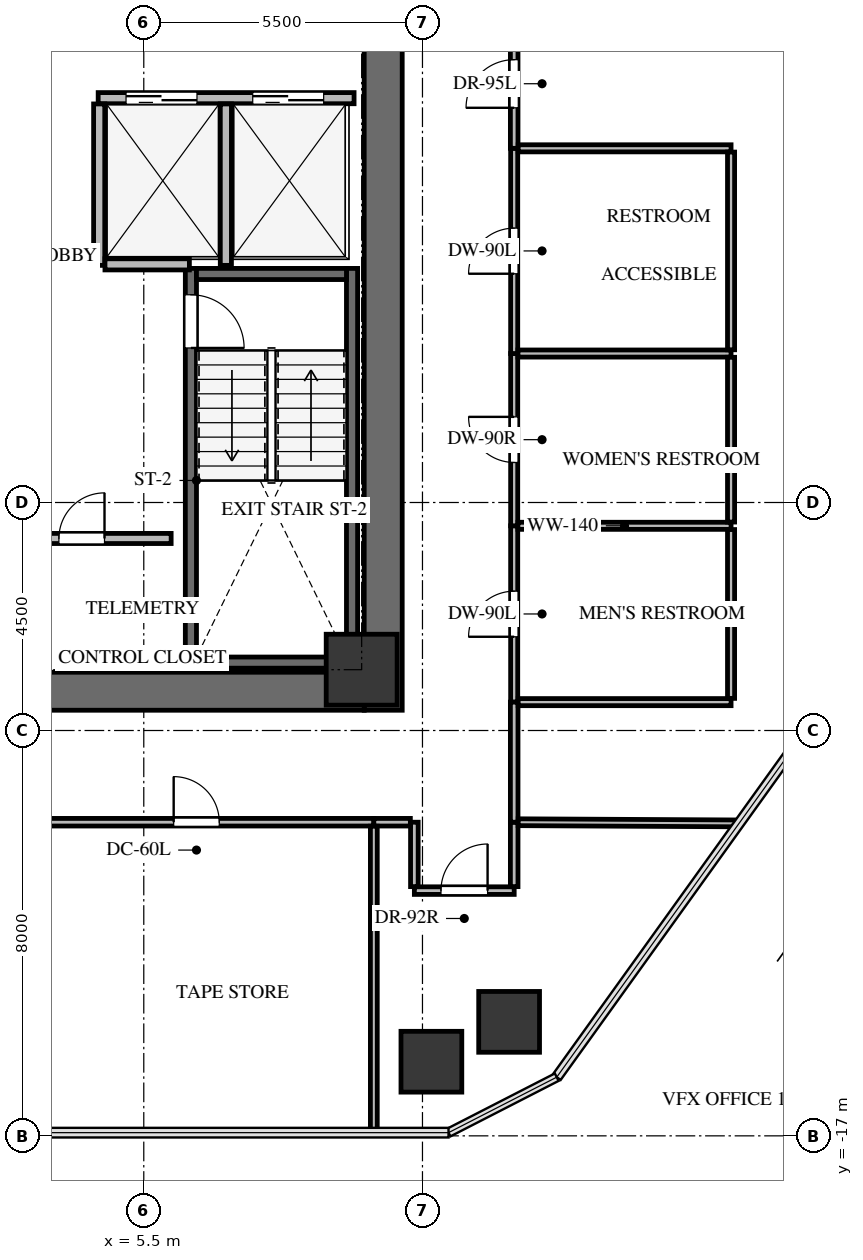
"""IFC4 building model, lengths in metres.
Left out: names, types, materials, properties, quantities, classifications, styles, units other than length and angle.
Written with IfcOpenShell. Run it as: python <this file> out.ifc"""

import sys

from ifc_helpers import new_model, si_unit, direction, frame, frame_2d, origin, origin_2d, place, context, subcontext, project, spatial, rectangle, extrude, source, transform, mapped, element, fill, save


model = new_model("IFC4")
c1 = context("Model", 3, precision=1e-05, world=origin(), true_north=direction((0.0, 1.0)))
c2 = subcontext(c1, "Body", "Model", "MODEL_VIEW")
j1 = project(units=[si_unit("LENGTHUNIT", "METRE"), si_unit("PLANEANGLEUNIT", "RADIAN")], contexts=[c1])
p1 = place(None, origin())
s1 = spatial("IfcSite", under=j1, at=p1, CompositionType="ELEMENT")
p2 = place(p1, origin())
s2 = spatial("IfcBuilding", under=s1, at=p2, CompositionType="ELEMENT")
p3 = place(p2, frame((0.0, 0.0, 110.7)))
s3 = spatial("IfcBuildingStorey", under=s2, at=p3, CompositionType="ELEMENT", Elevation=110.7)
p4 = place(p3, frame((10.225, -8.6, 0.0), z_axis=(0.0, 0.0, 1.0), x_axis=(0.0, 1.0, 0.0)))
e1 = element("IfcWall", 1, at=p4, inside=s3, PredefinedType="SHEAR", context=c2, shape_type="SweptSolid", body=[
    extrude(rectangle(XDim=17.2, YDim=0.75, at=frame_2d((8.6, 0.0))), origin(), (0.0, 0.0, 1.0), 3.3),
])
p5 = place(p3, frame((2.1, -8.225, 0.0), z_axis=(0.0, 0.0, 1.0), x_axis=(1.0, 0.0, 0.0)))
e2 = element("IfcWall", 2, at=p5, inside=s3, PredefinedType="SHEAR", context=c2, shape_type="SweptSolid", body=[
    extrude(rectangle(XDim=7.75, YDim=0.75, at=frame_2d((3.875, 0.0))), origin(), (0.0, 0.0, 1.0), 3.3),
])
p6 = place(p3, frame((9.61, -7.77, -0.24), z_axis=(0.0, 0.0, 1.0), x_axis=(0.0, 1.0, 0.0)))
e3 = element("IfcWall", 3, at=p6, inside=s3, PredefinedType="SHEAR", context=c2, shape_type="SweptSolid", body=[
    extrude(rectangle(XDim=7.89, YDim=0.22, at=frame_2d((3.945, 0.0))), origin(), (0.0, 0.0, 1.0), 3.3),
])
p7 = place(p3, frame((6.43, 0.12, -0.24), z_axis=(0.0, 0.0, 1.0), x_axis=(0.0, -1.0, 0.0)))
e4 = element("IfcWall", 4, at=p7, inside=s3, PredefinedType="SHEAR", context=c2, shape_type="SweptSolid", body=[
    extrude(rectangle(XDim=7.89, YDim=0.22, at=frame_2d((3.945, 0.0))), origin(), (0.0, 0.0, 1.0), 3.3),
])
p8 = place(p7, frame((0.52, 0.0, 0.0)))
e5 = element("IfcOpeningElement", 5, at=p8, cuts=e4, PredefinedType="OPENING", context=c2, shape_type="SweptSolid", body=[
    extrude(rectangle(XDim=1.05, YDim=2.15, at=frame_2d((0.525, 1.075))), frame((0.0, 0.12, 0.0), z_axis=(0.0, -1.0, 0.0), x_axis=(1.0, 0.0, 0.0)), (0.0, 0.0, 1.0), 0.24),
])
for number, where, z_axis, x_axis in (
    (6, (6.54, -7.66, -0.24), (0.0, 0.0, 1.0), (1.0, 0.0, 0.0)),
    (7, (9.5, 0.01, -0.24), (0.0, 0.0, 1.0), (-1.0, 0.0, 0.0)),
):
    element("IfcWall", number, at=place(p3, frame(where, z_axis=z_axis, x_axis=x_axis)), inside=s3, PredefinedType="SHEAR", context=c2, shape_type="SweptSolid", body=[
        extrude(rectangle(XDim=2.96, YDim=0.22, at=frame_2d((1.48, 0.0))), origin(), (0.0, 0.0, 1.0), 3.3),
    ])
m1 = source(origin(), c2, "Body", "SweptSolid", [
    extrude(rectangle(XDim=1.4, YDim=1.4, at=origin_2d()), origin(), (0.0, 0.0, 1.0), 3.3),
])
p9 = place(p3, frame((9.8, -7.8, -0.24), z_axis=(0.0, 0.0, 1.0), x_axis=(1.0, 0.0, 0.0)))
e8 = element("IfcColumn", 8, at=p9, inside=s3, PredefinedType="COLUMN", context=c2, shape_type="MappedRepresentation", body=[
    mapped(m1, transform((0.0, 0.0, 0.0), x_axis=(1.0, 0.0, 0.0), y_axis=(0.0, 1.0, 0.0), z_axis=(0.0, 0.0, 1.0), scale=1.0)),
])
m2 = source(origin(), c2, "Body", "SweptSolid", [
    extrude(rectangle(XDim=1.2, YDim=1.2, at=origin_2d()), origin(), (0.0, 0.0, 1.0), 3.3),
])
for number, where, z_axis, x_axis in (
    (9, (12.71, -14.75, -0.24), (0.0, 0.0, 1.0), (1.0, 0.0, 0.0)),
    (10, (11.176, -15.537, -0.24), (0.0, 0.0, 1.0), (1.0, 0.0, 0.0)),
):
    element("IfcColumn", number, at=place(p3, frame(where, z_axis=z_axis, x_axis=x_axis)), inside=s3, PredefinedType="COLUMN", context=c2, shape_type="MappedRepresentation", body=[
        mapped(m2, transform((0.0, 0.0, 0.0), x_axis=(1.0, 0.0, 0.0), y_axis=(0.0, 1.0, 0.0), z_axis=(0.0, 0.0, 1.0), scale=1.0)),
    ])
p10 = place(p3, frame((4.6, 3.48, 0.0), z_axis=(0.0, 0.0, 1.0), x_axis=(1.0, 0.0, 0.0)))
e11 = element("IfcWall", 11, at=p10, inside=s3, PredefinedType="SOLIDWALL", context=c2, shape_type="SweptSolid", body=[
    extrude(rectangle(XDim=5.05, YDim=0.22, at=frame_2d((2.525, 0.0))), origin(), (0.0, 0.0, 1.0), 3.045),
])
p11 = place(p10, frame((0.55, 0.0, 0.0)))
e12 = element("IfcOpeningElement", 12, at=p11, cuts=e11, PredefinedType="OPENING", context=c2, shape_type="SweptSolid", body=[
    extrude(rectangle(XDim=1.4, YDim=2.15, at=frame_2d((0.7, 1.075))), frame((0.0, 0.12, 0.0), z_axis=(0.0, -1.0, 0.0), x_axis=(1.0, 0.0, 0.0)), (0.0, 0.0, 1.0), 0.24),
])
p12 = place(p10, frame((3.05, 0.0, 0.0)))
e13 = element("IfcOpeningElement", 13, at=p12, cuts=e11, PredefinedType="OPENING", context=c2, shape_type="SweptSolid", body=[
    extrude(rectangle(XDim=1.4, YDim=2.15, at=frame_2d((0.7, 1.075))), frame((0.0, 0.12, 0.0), z_axis=(0.0, -1.0, 0.0), x_axis=(1.0, 0.0, 0.0)), (0.0, 0.0, 1.0), 0.24),
])
for number, where, z_axis, x_axis in (
    (14, (4.62, 0.18, 0.0), (0.0, 0.0, 1.0), (0.0, 1.0, 0.0)),
    (15, (7.12, 0.18, 0.0), (0.0, 0.0, 1.0), (0.0, 1.0, 0.0)),
):
    element("IfcWall", number, at=place(p3, frame(where, z_axis=z_axis, x_axis=x_axis)), inside=s3, PredefinedType="SOLIDWALL", context=c2, shape_type="SweptSolid", body=[
        extrude(rectangle(XDim=3.186, YDim=0.22, at=frame_2d((1.593, 0.0))), origin(), (0.0, 0.0, 1.0), 3.045),
    ])
p13 = place(p3, frame((4.734, 0.2, 0.0), z_axis=(0.0, 0.0, 1.0), x_axis=(1.0, 0.0, 0.0)))
e16 = element("IfcWall", 16, at=p13, inside=s3, PredefinedType="SOLIDWALL", context=c2, shape_type="SweptSolid", body=[
    extrude(rectangle(XDim=1.666, YDim=0.22, at=frame_2d((0.833, 0.0))), origin(), (0.0, 0.0, 1.0), 3.045),
])
p14 = place(p3, frame((2.51, -5.21, 0.0), z_axis=(0.0, 0.0, 1.0), x_axis=(1.0, 0.0, 0.0)))
e17 = element("IfcWall", 17, at=p14, inside=s3, PredefinedType="SOLIDWALL", context=c2, shape_type="SweptSolid", body=[
    extrude(rectangle(XDim=3.53, YDim=0.2, at=frame_2d((1.765, 0.0))), origin(), (0.0, 0.0, 1.0), 3.045),
])
p15 = place(p14, frame((1.315, 0.0, 0.0)))
e18 = element("IfcOpeningElement", 18, at=p15, cuts=e17, PredefinedType="OPENING", context=c2, shape_type="SweptSolid", body=[
    extrude(rectangle(XDim=0.9, YDim=2.05, at=frame_2d((0.45, 1.025))), frame((0.0, 0.11, 0.0), z_axis=(0.0, -1.0, 0.0), x_axis=(1.0, 0.0, 0.0)), (0.0, 0.0, 1.0), 0.22),
])
p16 = place(p3, frame((12.81, -8.44, 0.0), z_axis=(0.0, 0.0, 1.0), x_axis=(0.0, 1.0, 0.0)))
e19 = element("IfcWall", 19, at=p16, inside=s3, PredefinedType="PARTITIONING", context=c2, shape_type="SweptSolid", body=[
    extrude(rectangle(XDim=3.48, YDim=0.14, at=frame_2d((1.74, 0.0))), origin(), (0.0, 0.0, 1.0), 3.045),
])
p17 = place(p16, frame((1.29, 0.0, 0.0)))
e20 = element("IfcOpeningElement", 20, at=p17, cuts=e19, PredefinedType="OPENING", context=c2, shape_type="SweptSolid", body=[
    extrude(rectangle(XDim=0.9, YDim=2.05, at=frame_2d((0.45, 1.025))), frame((0.0, 0.08, 0.0), z_axis=(0.0, -1.0, 0.0), x_axis=(1.0, 0.0, 0.0)), (0.0, 0.0, 1.0), 0.16),
])
p18 = place(p3, frame((12.81, -4.96, 0.0), z_axis=(0.0, 0.0, 1.0), x_axis=(0.0, 1.0, 0.0)))
e21 = element("IfcWall", 21, at=p18, inside=s3, PredefinedType="PARTITIONING", context=c2, shape_type="SweptSolid", body=[
    extrude(rectangle(XDim=3.4, YDim=0.14, at=frame_2d((1.7, 0.0))), origin(), (0.0, 0.0, 1.0), 3.045),
])
p19 = place(p18, frame((1.25, 0.0, 0.0)))
e22 = element("IfcOpeningElement", 22, at=p19, cuts=e21, PredefinedType="OPENING", context=c2, shape_type="SweptSolid", body=[
    extrude(rectangle(XDim=0.9, YDim=2.05, at=frame_2d((0.45, 1.025))), frame((0.0, 0.08, 0.0), z_axis=(0.0, -1.0, 0.0), x_axis=(1.0, 0.0, 0.0)), (0.0, 0.0, 1.0), 0.16),
])
p20 = place(p3, frame((12.81, -1.56, 0.0), z_axis=(0.0, 0.0, 1.0), x_axis=(0.0, 1.0, 0.0)))
e23 = element("IfcWall", 23, at=p20, inside=s3, PredefinedType="PARTITIONING", context=c2, shape_type="SweptSolid", body=[
    extrude(rectangle(XDim=4.05, YDim=0.14, at=frame_2d((2.025, 0.0))), origin(), (0.0, 0.0, 1.0), 2.212),
])
p21 = place(p20, frame((1.575, 0.0, 0.0)))
e24 = element("IfcOpeningElement", 24, at=p21, cuts=e23, PredefinedType="OPENING", context=c2, shape_type="SweptSolid", body=[
    extrude(rectangle(XDim=0.9, YDim=2.05, at=frame_2d((0.45, 1.025))), frame((0.0, 0.08, 0.0), z_axis=(0.0, -1.0, 0.0), x_axis=(1.0, 0.0, 0.0)), (0.0, 0.0, 1.0), 0.16),
])
p22 = place(p3, frame((3.04, -10.81, 0.0), z_axis=(0.0, 0.0, 1.0), x_axis=(1.0, 0.0, 0.0)))
e25 = element("IfcWall", 25, at=p22, inside=s3, PredefinedType="PARTITIONING", context=c2, shape_type="SweptSolid", body=[
    extrude(rectangle(XDim=7.0, YDim=0.15, at=frame_2d((3.5, 0.0))), origin(), (0.0, 0.0, 1.0), 2.212),
])
p23 = place(p22, frame((3.05, 0.0, 0.0)))
e26 = element("IfcOpeningElement", 26, at=p23, cuts=e25, PredefinedType="OPENING", context=c2, shape_type="SweptSolid", body=[
    extrude(rectangle(XDim=0.9, YDim=2.05, at=frame_2d((0.45, 1.025))), frame((0.0, 0.085, 0.0), z_axis=(0.0, -1.0, 0.0), x_axis=(1.0, 0.0, 0.0)), (0.0, 0.0, 1.0), 0.17),
])
p24 = place(p3, frame((10.84, -12.16, 0.0), z_axis=(0.0, 0.0, 1.0), x_axis=(1.0, 0.0, 0.0)))
e27 = element("IfcWall", 27, at=p24, inside=s3, PredefinedType="PARTITIONING", context=c2, shape_type="SweptSolid", body=[
    extrude(rectangle(XDim=1.97, YDim=0.15, at=frame_2d((0.985, 0.0))), origin(), (0.0, 0.0, 1.0), 3.045),
])
p25 = place(p24, frame((0.525, 0.0, 0.0)))
e28 = element("IfcOpeningElement", 28, at=p25, cuts=e27, PredefinedType="OPENING", context=c2, shape_type="SweptSolid", body=[
    extrude(rectangle(XDim=0.92, YDim=2.1, at=frame_2d((0.46, 1.05))), frame((0.0, 0.085, 0.0), z_axis=(0.0, -1.0, 0.0), x_axis=(1.0, 0.0, 0.0)), (0.0, 0.0, 1.0), 0.17),
])
for number, where, z_axis, x_axis in (
    (29, (10.84, -10.81, 0.0), (0.0, 0.0, 1.0), (0.0, -1.0, 0.0)),
    (30, (12.81, -12.081, 0.0), (0.0, 0.0, 1.0), (0.0, 1.0, 0.0)),
):
    element("IfcWall", number, at=place(p3, frame(where, z_axis=z_axis, x_axis=x_axis)), inside=s3, PredefinedType="PARTITIONING", context=c2, shape_type="SweptSolid", body=[
        extrude(rectangle(XDim=1.271, YDim=0.15, at=frame_2d((0.635, 0.0))), origin(), (0.0, 0.0, 1.0), 3.045),
    ])
p26 = place(p3, frame((10.04, -10.81, 0.0), z_axis=(0.0, 0.0, 1.0), x_axis=(1.0, 0.0, 0.0)))
e31 = element("IfcWall", 31, at=p26, inside=s3, PredefinedType="PARTITIONING", context=c2, shape_type="SweptSolid", body=[
    extrude(rectangle(XDim=0.721, YDim=0.15, at=frame_2d((0.36, 0.0))), origin(), (0.0, 0.0, 1.0), 3.045),
])
p27 = place(p3, frame((12.81, 2.49, 0.0), z_axis=(0.0, 0.0, 1.0), x_axis=(0.0, 1.0, 0.0)))
e32 = element("IfcWall", 32, at=p27, inside=s3, PredefinedType="PARTITIONING", context=c2, shape_type="SweptSolid", body=[
    extrude(rectangle(XDim=2.55, YDim=0.15, at=frame_2d((1.275, 0.0))), origin(), (0.0, 0.0, 1.0), 3.045),
])
p28 = place(p27, frame((0.8, 0.0, 0.0)))
e33 = element("IfcOpeningElement", 33, at=p28, cuts=e32, PredefinedType="OPENING", context=c2, shape_type="SweptSolid", body=[
    extrude(rectangle(XDim=0.95, YDim=2.1, at=frame_2d((0.475, 1.05))), frame((0.0, 0.085, 0.0), z_axis=(0.0, -1.0, 0.0), x_axis=(1.0, 0.0, 0.0)), (0.0, 0.0, 1.0), 0.17),
])
p29 = place(p3, frame((12.81, -10.81, 0.0), z_axis=(0.0, 0.0, 1.0), x_axis=(0.0, 1.0, 0.0)))
e34 = element("IfcWall", 34, at=p29, inside=s3, PredefinedType="PARTITIONING", context=c2, shape_type="SweptSolid", body=[
    extrude(rectangle(XDim=2.37, YDim=0.15, at=frame_2d((1.185, 0.0))), origin(), (0.0, 0.0, 1.0), 3.045),
])
p30 = place(p3, frame((12.884, -4.96, 0.0), z_axis=(0.0, 0.0, 1.0), x_axis=(1.0, 0.0, 0.0)))
e35 = element("IfcWall", 35, at=p30, inside=s3, PredefinedType="PARTITIONING", context=c2, shape_type="SweptSolid", body=[
    extrude(rectangle(XDim=4.206, YDim=0.14, at=frame_2d((2.103, 0.0))), origin(), (0.0, 0.0, 1.0), 3.045),
])
p31 = place(p3, frame((17.09, -8.44, 0.0), z_axis=(0.0, 0.0, 1.0), x_axis=(-1.0, 0.0, 0.0)))
e36 = element("IfcWall", 36, at=p31, inside=s3, PredefinedType="PARTITIONING", context=c2, shape_type="SweptSolid", body=[
    extrude(rectangle(XDim=4.201, YDim=0.14, at=frame_2d((2.101, 0.0))), origin(), (0.0, 0.0, 1.0), 2.38),
])
p32 = place(p3, frame((17.09, -5.034, 0.0), z_axis=(0.0, 0.0, 1.0), x_axis=(0.0, -1.0, 0.0)))
e37 = element("IfcWall", 37, at=p32, inside=s3, PredefinedType="PARTITIONING", context=c2, shape_type="SweptSolid", body=[
    extrude(rectangle(XDim=3.332, YDim=0.14, at=frame_2d((1.666, 0.0))), origin(), (0.0, 0.0, 1.0), 2.38),
])
p33 = place(p3, frame((12.884, -1.56, 0.0), z_axis=(0.0, 0.0, 1.0), x_axis=(1.0, 0.0, 0.0)))
e38 = element("IfcWall", 38, at=p33, inside=s3, PredefinedType="PARTITIONING", context=c2, shape_type="SweptSolid", body=[
    extrude(rectangle(XDim=4.206, YDim=0.14, at=frame_2d((2.103, 0.0))), origin(), (0.0, 0.0, 1.0), 3.045),
])
p34 = place(p3, frame((17.09, -1.634, 0.0), z_axis=(0.0, 0.0, 1.0), x_axis=(0.0, -1.0, 0.0)))
e39 = element("IfcWall", 39, at=p34, inside=s3, PredefinedType="PARTITIONING", context=c2, shape_type="SweptSolid", body=[
    extrude(rectangle(XDim=3.252, YDim=0.14, at=frame_2d((1.626, 0.0))), origin(), (0.0, 0.0, 1.0), 3.045),
])
p35 = place(p3, frame((12.889, 2.49, 0.0), z_axis=(0.0, 0.0, 1.0), x_axis=(1.0, 0.0, 0.0)))
e40 = element("IfcWall", 40, at=p35, inside=s3, PredefinedType="PARTITIONING", context=c2, shape_type="SweptSolid", body=[
    extrude(rectangle(XDim=4.201, YDim=0.14, at=frame_2d((2.101, 0.0))), origin(), (0.0, 0.0, 1.0), 3.045),
])
p36 = place(p3, frame((17.09, 2.416, 0.0), z_axis=(0.0, 0.0, 1.0), x_axis=(0.0, -1.0, 0.0)))
e41 = element("IfcWall", 41, at=p36, inside=s3, PredefinedType="PARTITIONING", context=c2, shape_type="SweptSolid", body=[
    extrude(rectangle(XDim=3.902, YDim=0.14, at=frame_2d((1.951, 0.0))), origin(), (0.0, 0.0, 1.0), 2.212),
])
p37 = place(p3, frame((10.04, -10.889, 0.0), z_axis=(0.0, 0.0, 1.0), x_axis=(0.0, -1.0, 0.0)))
e42 = element("IfcWall", 42, at=p37, inside=s3, PredefinedType="PARTITIONING", context=c2, shape_type="SweptSolid", body=[
    extrude(rectangle(XDim=6.048, YDim=0.135, at=frame_2d((3.024, 0.0))), origin(), (0.0, 0.0, 1.0), 2.212),
])
p38 = place(p3, frame((12.889, -10.81, 0.0), z_axis=(0.0, 0.0, 1.0), x_axis=(0.999986140562, -0.005264853658, 0.0)))
e43 = element("IfcWall", 43, at=p38, inside=s3, PredefinedType="PARTITIONING", context=c2, shape_type="SweptSolid", body=[
    extrude(rectangle(XDim=4.359, YDim=0.135, at=frame_2d((2.179, 0.0))), origin(), (0.0, 0.0, 1.0), 2.38),
])
m3 = source(origin(), c2, "Body", "SweptSolid", [
    extrude(rectangle(XDim=1.05, YDim=2.15, at=frame_2d((0.525, 1.075))), frame((0.0, 0.025, 0.0), z_axis=(0.0, -1.0, 0.0), x_axis=(1.0, 0.0, 0.0)), (0.0, 0.0, 1.0), 0.05),
])
p39 = place(p8, origin())
e44 = element("IfcDoor", 44, at=p39, inside=s3, OperationType="SINGLE_SWING_RIGHT", PredefinedType="DOOR", context=c2, shape_type="MappedRepresentation", body=[
    mapped(m3, transform((0.0, 0.0, 0.0), x_axis=(1.0, 0.0, 0.0), y_axis=(0.0, 1.0, 0.0), z_axis=(0.0, 0.0, 1.0), scale=1.0)),
])
fill(e5, e44)
m4 = source(origin(), c2, "Body", "SweptSolid", [
    extrude(rectangle(XDim=1.4, YDim=2.15, at=frame_2d((0.7, 1.075))), frame((0.0, 0.025, 0.0), z_axis=(0.0, -1.0, 0.0), x_axis=(1.0, 0.0, 0.0)), (0.0, 0.0, 1.0), 0.05),
])
p40 = place(p11, origin())
e45 = element("IfcDoor", 45, at=p40, inside=s3, OperationType="DOUBLE_DOOR_SLIDING", PredefinedType="DOOR", context=c2, shape_type="MappedRepresentation", body=[
    mapped(m4, transform((0.0, 0.0, 0.0), x_axis=(1.0, 0.0, 0.0), y_axis=(0.0, 1.0, 0.0), z_axis=(0.0, 0.0, 1.0), scale=1.0)),
])
fill(e12, e45)
p41 = place(p12, origin())
e46 = element("IfcDoor", 46, at=p41, inside=s3, OperationType="DOUBLE_DOOR_SLIDING", PredefinedType="DOOR", context=c2, shape_type="MappedRepresentation", body=[
    mapped(m4, transform((0.0, 0.0, 0.0), x_axis=(1.0, 0.0, 0.0), y_axis=(0.0, 1.0, 0.0), z_axis=(0.0, 0.0, 1.0), scale=1.0)),
])
fill(e13, e46)
m5 = source(origin(), c2, "Body", "SweptSolid", [
    extrude(rectangle(XDim=0.9, YDim=2.05, at=frame_2d((0.45, 1.025))), frame((0.0, 0.025, 0.0), z_axis=(0.0, -1.0, 0.0), x_axis=(1.0, 0.0, 0.0)), (0.0, 0.0, 1.0), 0.05),
])
p42 = place(p15, origin())
e47 = element("IfcDoor", 47, at=p42, inside=s3, OperationType="SINGLE_SWING_RIGHT", PredefinedType="DOOR", context=c2, shape_type="MappedRepresentation", body=[
    mapped(m5, transform((0.0, 0.0, 0.0), x_axis=(1.0, 0.0, 0.0), y_axis=(0.0, 1.0, 0.0), z_axis=(0.0, 0.0, 1.0), scale=1.0)),
])
fill(e18, e47)
m6 = source(origin(), c2, "Body", "SweptSolid", [
    extrude(rectangle(XDim=0.9, YDim=2.05, at=frame_2d((0.45, 1.025))), frame((0.0, 0.025, 0.0), z_axis=(0.0, -1.0, 0.0), x_axis=(1.0, 0.0, 0.0)), (0.0, 0.0, 1.0), 0.05),
])
p43 = place(p17, origin())
e48 = element("IfcDoor", 48, at=p43, inside=s3, OperationType="SINGLE_SWING_LEFT", PredefinedType="DOOR", context=c2, shape_type="MappedRepresentation", body=[
    mapped(m6, transform((0.0, 0.0, 0.0), x_axis=(1.0, 0.0, 0.0), y_axis=(0.0, 1.0, 0.0), z_axis=(0.0, 0.0, 1.0), scale=1.0)),
])
fill(e20, e48)
m7 = source(origin(), c2, "Body", "SweptSolid", [
    extrude(rectangle(XDim=0.9, YDim=2.05, at=frame_2d((0.45, 1.025))), frame((0.0, 0.025, 0.0), z_axis=(0.0, -1.0, 0.0), x_axis=(1.0, 0.0, 0.0)), (0.0, 0.0, 1.0), 0.05),
])
p44 = place(p19, origin())
e49 = element("IfcDoor", 49, at=p44, inside=s3, OperationType="SINGLE_SWING_RIGHT", PredefinedType="DOOR", context=c2, shape_type="MappedRepresentation", body=[
    mapped(m7, transform((0.0, 0.0, 0.0), x_axis=(1.0, 0.0, 0.0), y_axis=(0.0, 1.0, 0.0), z_axis=(0.0, 0.0, 1.0), scale=1.0)),
])
fill(e22, e49)
p45 = place(p21, origin())
e50 = element("IfcDoor", 50, at=p45, inside=s3, OperationType="SINGLE_SWING_LEFT", PredefinedType="DOOR", context=c2, shape_type="MappedRepresentation", body=[
    mapped(m6, transform((0.0, 0.0, 0.0), x_axis=(1.0, 0.0, 0.0), y_axis=(0.0, 1.0, 0.0), z_axis=(0.0, 0.0, 1.0), scale=1.0)),
])
fill(e24, e50)
m8 = source(origin(), c2, "Body", "SweptSolid", [
    extrude(rectangle(XDim=0.9, YDim=2.05, at=frame_2d((0.45, 1.025))), frame((0.0, 0.025, 0.0), z_axis=(0.0, -1.0, 0.0), x_axis=(1.0, 0.0, 0.0)), (0.0, 0.0, 1.0), 0.05),
])
p46 = place(p23, origin())
e51 = element("IfcDoor", 51, at=p46, inside=s3, OperationType="SINGLE_SWING_LEFT", PredefinedType="DOOR", context=c2, shape_type="MappedRepresentation", body=[
    mapped(m8, transform((0.0, 0.0, 0.0), x_axis=(1.0, 0.0, 0.0), y_axis=(0.0, 1.0, 0.0), z_axis=(0.0, 0.0, 1.0), scale=1.0)),
])
fill(e26, e51)
m9 = source(origin(), c2, "Body", "SweptSolid", [
    extrude(rectangle(XDim=0.92, YDim=2.1, at=frame_2d((0.46, 1.05))), frame((0.0, 0.025, 0.0), z_axis=(0.0, -1.0, 0.0), x_axis=(1.0, 0.0, 0.0)), (0.0, 0.0, 1.0), 0.05),
])
p47 = place(p25, origin())
e52 = element("IfcDoor", 52, at=p47, inside=s3, OperationType="SINGLE_SWING_RIGHT", PredefinedType="DOOR", context=c2, shape_type="MappedRepresentation", body=[
    mapped(m9, transform((0.0, 0.0, 0.0), x_axis=(1.0, 0.0, 0.0), y_axis=(0.0, 1.0, 0.0), z_axis=(0.0, 0.0, 1.0), scale=1.0)),
])
fill(e28, e52)
m10 = source(origin(), c2, "Body", "SweptSolid", [
    extrude(rectangle(XDim=0.95, YDim=2.1, at=frame_2d((0.475, 1.05))), frame((0.0, 0.025, 0.0), z_axis=(0.0, -1.0, 0.0), x_axis=(1.0, 0.0, 0.0)), (0.0, 0.0, 1.0), 0.05),
])
p48 = place(p28, origin())
e53 = element("IfcDoor", 53, at=p48, inside=s3, OperationType="SINGLE_SWING_LEFT", PredefinedType="DOOR", context=c2, shape_type="MappedRepresentation", body=[
    mapped(m10, transform((0.0, 0.0, 0.0), x_axis=(1.0, 0.0, 0.0), y_axis=(0.0, 1.0, 0.0), z_axis=(0.0, 0.0, 1.0), scale=1.0)),
])
fill(e33, e53)
save(model, sys.argv[1])
